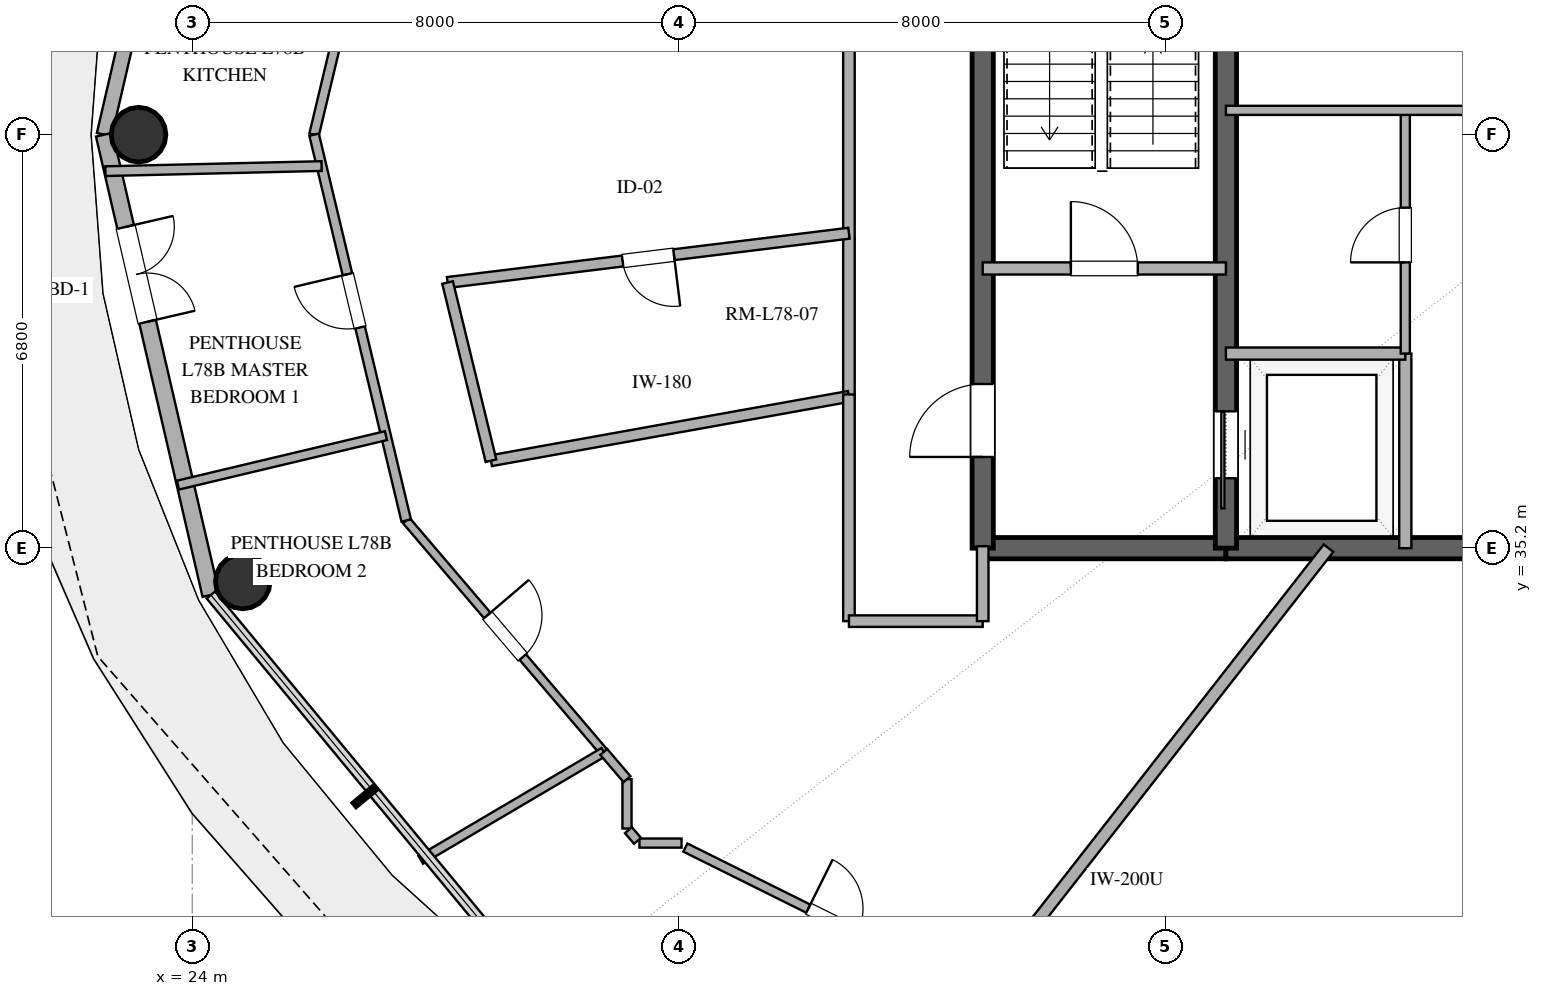
"""IFC4 building model, lengths in metres.
Left out: names, types, materials, properties, quantities, classifications, styles, units other than length and angle.
Written with IfcOpenShell. Run it as: python <this file> out.ifc"""

import sys

from ifc_helpers import new_model, si_unit, direction, frame, frame_2d, origin, origin_2d, place, context, subcontext, project, spatial, rectangle, hollow_circle, extrude, element, fill, save


model = new_model("IFC4")
c1 = context("Model", 3, precision=1e-05, world=origin(), true_north=direction((0.0, 1.0)))
c2 = subcontext(c1, "Body", "Model", "MODEL_VIEW")
j1 = project(units=[si_unit("LENGTHUNIT", "METRE"), si_unit("PLANEANGLEUNIT", "RADIAN")], contexts=[c1])
p1 = place(None, origin())
s1 = spatial("IfcSite", under=j1, at=p1, CompositionType="ELEMENT")
p2 = place(p1, origin())
s2 = spatial("IfcBuilding", under=s1, at=p2, CompositionType="ELEMENT")
p3 = place(p2, frame((0.0, 0.0, 301.8)))
s3 = spatial("IfcBuildingStorey", under=s2, at=p3, CompositionType="ELEMENT", Elevation=301.8)
p4 = place(p3, frame((37.0, 35.2, 0.0), z_axis=(0.0, 0.0, 1.0), x_axis=(1.0, 0.0, 0.0)))
e1 = element("IfcWall", 1, at=p4, inside=s3, PredefinedType="SHEAR", context=c2, shape_type="SweptSolid", body=[
    extrude(rectangle(XDim=4.0, YDim=0.35, at=frame_2d((2.0, 0.0))), origin(), (0.0, 0.0, 1.0), 3.37),
])
p5 = place(p3, frame((41.0, 35.2, 0.0), z_axis=(0.0, 0.0, 1.0), x_axis=(1.0, 0.0, 0.0)))
e2 = element("IfcWall", 2, at=p5, inside=s3, PredefinedType="SHEAR", context=c2, shape_type="SweptSolid", body=[
    extrude(rectangle(XDim=14.0, YDim=0.35, at=frame_2d((7.0, 0.0))), origin(), (0.0, 0.0, 1.0), 3.37),
])
p6 = place(p5, frame((6.1, 0.0, 0.0)))
e3 = element("IfcOpeningElement", 3, at=p6, cuts=e2, PredefinedType="OPENING", context=c2, shape_type="SweptSolid", body=[
    extrude(rectangle(XDim=1.8, YDim=2.25, at=frame_2d((0.9, 1.125))), frame((0.0, 0.185, 0.0), z_axis=(0.0, -1.0, 0.0), x_axis=(1.0, 0.0, 0.0)), (0.0, 0.0, 1.0), 0.37),
])
p7 = place(p3, frame((37.0, 35.2, 0.0), z_axis=(0.0, 0.0, 1.0), x_axis=(0.0, 1.0, 0.0)))
e4 = element("IfcWall", 4, at=p7, inside=s3, PredefinedType="SHEAR", context=c2, shape_type="SweptSolid", body=[
    extrude(rectangle(XDim=13.6, YDim=0.35, at=frame_2d((6.8, 0.0))), origin(), (0.0, 0.0, 1.0), 3.37),
])
p8 = place(p7, frame((1.5, 0.0, 0.0)))
e5 = element("IfcOpeningElement", 5, at=p8, cuts=e4, PredefinedType="OPENING", context=c2, shape_type="SweptSolid", body=[
    extrude(rectangle(XDim=1.2, YDim=2.15, at=frame_2d((0.6, 1.075))), frame((0.0, 0.185, 0.0), z_axis=(0.0, -1.0, 0.0), x_axis=(1.0, 0.0, 0.0)), (0.0, 0.0, 1.0), 0.37),
])
p9 = place(p3, frame((41.0, 35.2, 0.0), z_axis=(0.0, 0.0, 1.0), x_axis=(0.0, 1.0, 0.0)))
e6 = element("IfcWall", 6, at=p9, inside=s3, PredefinedType="SHEAR", context=c2, shape_type="SweptSolid", body=[
    extrude(rectangle(XDim=13.6, YDim=0.35, at=frame_2d((6.8, 0.0))), origin(), (0.0, 0.0, 1.0), 3.37),
])
p10 = place(p9, frame((1.15, 0.0, 0.0)))
e7 = element("IfcOpeningElement", 7, at=p10, cuts=e6, PredefinedType="OPENING", context=c2, shape_type="SweptSolid", body=[
    extrude(rectangle(XDim=1.1, YDim=2.2, at=frame_2d((0.55, 1.1))), frame((0.0, 0.185, 0.0), z_axis=(0.0, -1.0, 0.0), x_axis=(1.0, 0.0, 0.0)), (0.0, 0.0, 1.0), 0.37),
])
for number, where, z_axis, x_axis in (
    (8, (23.117, 42.0, 0.0), (0.0, 0.0, 1.0), (1.0, 0.0, 0.0)),
    (9, (24.831, 34.653, 0.0), (0.0, 0.0, 1.0), (1.0, 0.0, 0.0)),
):
    element("IfcColumn", number, at=place(p3, frame(where, z_axis=z_axis, x_axis=x_axis)), inside=s3, PredefinedType="COLUMN", context=c2, shape_type="SweptSolid", body=[
        extrude(hollow_circle(Radius=0.45, WallThickness=0.025, at=origin_2d()), origin(), (0.0, 0.0, 1.0), 3.37),
    ])
p11 = place(p3, frame((24.306, 49.57, 0.0), z_axis=(0.0, 0.0, 1.0), x_axis=(-0.225635078214, -0.974211892495, 0.0)))
e10 = element("IfcWall", 10, at=p11, inside=s3, PredefinedType="SOLIDWALL", context=c2, shape_type="SweptSolid", body=[
    extrude(rectangle(XDim=7.77, YDim=0.25, at=frame_2d((3.885, 0.0))), origin(), (0.0, 0.0, 1.0), 3.37),
])
p12 = place(p3, frame((22.553, 42.0, 0.0), z_axis=(0.0, 0.0, 1.0), x_axis=(0.225635078214, -0.974211892495, 0.0)))
e11 = element("IfcWall", 11, at=p12, inside=s3, PredefinedType="SOLIDWALL", context=c2, shape_type="SweptSolid", body=[
    extrude(rectangle(XDim=7.77, YDim=0.28, at=frame_2d((3.885, 0.0))), origin(), (0.0, 0.0, 1.0), 3.37),
])
p13 = place(p12, frame((1.557, 0.0, 0.0)))
e12 = element("IfcOpeningElement", 12, at=p13, cuts=e11, PredefinedType="OPENING", context=c2, shape_type="SweptSolid", body=[
    extrude(rectangle(XDim=1.6, YDim=2.25, at=frame_2d((0.8, 1.125))), frame((0.0, 0.15, 0.0), z_axis=(0.0, -1.0, 0.0), x_axis=(1.0, 0.0, 0.0)), (0.0, 0.0, 1.0), 0.3),
])
p14 = place(p3, frame((37.0, 39.8, 0.0), z_axis=(0.0, 0.0, 1.0), x_axis=(1.0, 0.0, 0.0)))
e13 = element("IfcWall", 13, at=p14, inside=s3, PredefinedType="SOLIDWALL", context=c2, shape_type="SweptSolid", body=[
    extrude(rectangle(XDim=4.0, YDim=0.2, at=frame_2d((2.0, 0.0))), origin(), (0.0, 0.0, 1.0), 2.73),
])
p15 = place(p14, frame((1.45, 0.0, 0.0)))
e14 = element("IfcOpeningElement", 14, at=p15, cuts=e13, PredefinedType="OPENING", context=c2, shape_type="SweptSolid", body=[
    extrude(rectangle(XDim=1.1, YDim=2.15, at=frame_2d((0.55, 1.075))), frame((0.0, 0.11, 0.0), z_axis=(0.0, -1.0, 0.0), x_axis=(1.0, 0.0, 0.0)), (0.0, 0.0, 1.0), 0.22),
])
p16 = place(p3, frame((43.95, 35.2, 0.0), z_axis=(0.0, 0.0, 1.0), x_axis=(0.0, 1.0, 0.0)))
e15 = element("IfcWall", 15, at=p16, inside=s3, PredefinedType="SOLIDWALL", context=c2, shape_type="SweptSolid", body=[
    extrude(rectangle(XDim=3.2, YDim=0.2, at=frame_2d((1.6, 0.0))), origin(), (0.0, 0.0, 1.0), 2.73),
])
p17 = place(p3, frame((41.0, 38.4, 0.0), z_axis=(0.0, 0.0, 1.0), x_axis=(1.0, 0.0, 0.0)))
e16 = element("IfcWall", 16, at=p17, inside=s3, PredefinedType="SOLIDWALL", context=c2, shape_type="SweptSolid", body=[
    extrude(rectangle(XDim=2.95, YDim=0.2, at=frame_2d((1.475, 0.0))), origin(), (0.0, 0.0, 1.0), 2.73),
])
p18 = place(p3, frame((43.95, 38.4, 0.0), z_axis=(0.0, 0.0, 1.0), x_axis=(0.0, 1.0, 0.0)))
e17 = element("IfcWall", 17, at=p18, inside=s3, PredefinedType="PARTITIONING", context=c2, shape_type="SweptSolid", body=[
    extrude(rectangle(XDim=4.0, YDim=0.15, at=frame_2d((2.0, 0.0))), origin(), (0.0, 0.0, 1.0), 2.73),
])
p19 = place(p18, frame((1.5, 0.0, 0.0)))
e18 = element("IfcOpeningElement", 18, at=p19, cuts=e17, PredefinedType="OPENING", context=c2, shape_type="SweptSolid", body=[
    extrude(rectangle(XDim=0.9, YDim=2.15, at=frame_2d((0.45, 1.075))), frame((0.0, 0.085, 0.0), z_axis=(0.0, -1.0, 0.0), x_axis=(1.0, 0.0, 0.0)), (0.0, 0.0, 1.0), 0.17),
])
p20 = place(p3, frame((41.0, 42.4, 0.0), z_axis=(0.0, 0.0, 1.0), x_axis=(1.0, 0.0, 0.0)))
e19 = element("IfcWall", 19, at=p20, inside=s3, PredefinedType="PARTITIONING", context=c2, shape_type="SweptSolid", body=[
    extrude(rectangle(XDim=4.85, YDim=0.15, at=frame_2d((2.425, 0.0))), origin(), (0.0, 0.0, 1.0), 2.73),
])
p21 = place(p3, frame((34.8, 37.663, 0.0), z_axis=(0.0, 0.0, 1.0), x_axis=(0.0, 1.0, 0.0)))
e20 = element("IfcWall", 20, at=p21, inside=s3, PredefinedType="PARTITIONING", context=c2, shape_type="SweptSolid", body=[
    extrude(rectangle(XDim=13.237, YDim=0.19, at=frame_2d((6.618, 0.0))), origin(), (0.0, 0.0, 1.0), 2.73),
])
p22 = place(p21, frame((7.46, 0.0, 0.0)))
e21 = element("IfcOpeningElement", 21, at=p22, cuts=e20, PredefinedType="OPENING", context=c2, shape_type="SweptSolid", body=[
    extrude(rectangle(XDim=1.0, YDim=2.2, at=frame_2d((0.5, 1.1))), frame((0.0, 0.105, 0.0), z_axis=(0.0, -1.0, 0.0), x_axis=(1.0, 0.0, 0.0)), (0.0, 0.0, 1.0), 0.21),
])
p23 = place(p3, frame((42.687, 35.2, 0.0), z_axis=(0.0, 0.0, 1.0), x_axis=(-0.615663811723, -0.788008928208, 0.0)))
e22 = element("IfcWall", 22, at=p23, inside=s3, PredefinedType="PARTITIONING", context=c2, shape_type="SweptSolid", body=[
    extrude(rectangle(XDim=12.701, YDim=0.2, at=frame_2d((6.351, 0.0))), origin(), (0.0, 0.0, 1.0), 2.73),
])
p24 = place(p3, frame((34.8, 40.379, 0.0), z_axis=(0.0, 0.0, 1.0), x_axis=(-0.99254493565, -0.121879246453, 0.0)))
e23 = element("IfcWall", 23, at=p24, inside=s3, PredefinedType="PLUMBINGWALL", context=c2, shape_type="SweptSolid", body=[
    extrude(rectangle(XDim=6.65, YDim=0.18, at=frame_2d((3.325, 0.0))), origin(), (0.0, 0.0, 1.0), 2.73),
])
p25 = place(p24, frame((2.9, 0.0, 0.0)))
e24 = element("IfcOpeningElement", 24, at=p25, cuts=e23, PredefinedType="OPENING", context=c2, shape_type="SweptSolid", body=[
    extrude(rectangle(XDim=0.85, YDim=2.1, at=frame_2d((0.425, 1.05))), frame((0.0, 0.1, 0.0), z_axis=(0.0, -1.0, 0.0), x_axis=(1.0, 0.0, 0.0)), (0.0, 0.0, 1.0), 0.2),
])
p26 = place(p3, frame((28.913, 36.638, 0.0), z_axis=(0.0, 0.0, 1.0), x_axis=(0.984251000252, 0.176776606208, 0.0)))
e25 = element("IfcWall", 25, at=p26, inside=s3, PredefinedType="PLUMBINGWALL", context=c2, shape_type="SweptSolid", body=[
    extrude(rectangle(XDim=5.981, YDim=0.18, at=frame_2d((2.991, 0.0))), origin(), (0.0, 0.0, 1.0), 2.73),
])
p27 = place(p3, frame((32.11, 30.276, 0.0), z_axis=(0.0, 0.0, 1.0), x_axis=(0.895587674753, -0.444885060247, 0.0)))
e26 = element("IfcWall", 26, at=p27, inside=s3, PredefinedType="PARTITIONING", context=c2, shape_type="SweptSolid", body=[
    extrude(rectangle(XDim=5.414, YDim=0.15, at=frame_2d((2.707, 0.0))), origin(), (0.0, 0.0, 1.0), 2.73),
])
p28 = place(p27, frame((2.257, 0.0, 0.0)))
e27 = element("IfcOpeningElement", 27, at=p28, cuts=e26, PredefinedType="OPENING", context=c2, shape_type="SweptSolid", body=[
    extrude(rectangle(XDim=0.9, YDim=2.1, at=frame_2d((0.45, 1.05))), frame((0.0, 0.085, 0.0), z_axis=(0.0, -1.0, 0.0), x_axis=(1.0, 0.0, 0.0)), (0.0, 0.0, 1.0), 0.17),
])
p29 = place(p3, frame((27.204, 47.026, 0.0), z_axis=(0.0, 0.0, 1.0), x_axis=(-0.232306036208, -0.972642743016, 0.0)))
e28 = element("IfcWall", 28, at=p29, inside=s3, PredefinedType="PLUMBINGWALL", context=c2, shape_type="SweptSolid", body=[
    extrude(rectangle(XDim=5.167, YDim=0.16, at=frame_2d((2.584, 0.0))), origin(), (0.0, 0.0, 1.0), 2.73),
])
p30 = place(p29, frame((2.134, 0.0, 0.0)))
e29 = element("IfcOpeningElement", 29, at=p30, cuts=e28, PredefinedType="OPENING", context=c2, shape_type="SweptSolid", body=[
    extrude(rectangle(XDim=0.9, YDim=2.1, at=frame_2d((0.45, 1.05))), frame((0.0, 0.09, 0.0), z_axis=(0.0, -1.0, 0.0), x_axis=(1.0, 0.0, 0.0)), (0.0, 0.0, 1.0), 0.18),
])
p31 = place(p3, frame((27.519, 35.655, 0.0), z_axis=(0.0, 0.0, 1.0), x_axis=(0.649223146716, -0.760597992219, 0.0)))
e30 = element("IfcWall", 30, at=p31, inside=s3, PredefinedType="PARTITIONING", context=c2, shape_type="SweptSolid", body=[
    extrude(rectangle(XDim=5.004, YDim=0.14, at=frame_2d((2.502, 0.0))), origin(), (0.0, 0.0, 1.0), 2.73),
])
p32 = place(p31, frame((2.052, 0.0, 0.0)))
e31 = element("IfcOpeningElement", 31, at=p32, cuts=e30, PredefinedType="OPENING", context=c2, shape_type="SweptSolid", body=[
    extrude(rectangle(XDim=0.9, YDim=2.1, at=frame_2d((0.45, 1.05))), frame((0.0, 0.08, 0.0), z_axis=(0.0, -1.0, 0.0), x_axis=(1.0, 0.0, 0.0)), (0.0, 0.0, 1.0), 0.16),
])
p33 = place(p3, frame((27.519, 35.655, 0.0), z_axis=(0.0, 0.0, 1.0), x_axis=(-0.232298462197, 0.972644551962, 0.0)))
e32 = element("IfcWall", 32, at=p33, inside=s3, PredefinedType="PLUMBINGWALL", context=c2, shape_type="SweptSolid", body=[
    extrude(rectangle(XDim=6.523, YDim=0.16, at=frame_2d((3.262, 0.0))), origin(), (0.0, 0.0, 1.0), 2.73),
])
p34 = place(p33, frame((3.264, 0.0, 0.0)))
e33 = element("IfcOpeningElement", 33, at=p34, cuts=e32, PredefinedType="OPENING", context=c2, shape_type="SweptSolid", body=[
    extrude(rectangle(XDim=0.9, YDim=2.1, at=frame_2d((0.45, 1.05))), frame((0.0, 0.09, 0.0), z_axis=(0.0, -1.0, 0.0), x_axis=(1.0, 0.0, 0.0)), (0.0, 0.0, 1.0), 0.18),
])
p35 = place(p3, frame((34.8, 34.0, 0.0), z_axis=(0.0, 0.0, 1.0), x_axis=(0.0, 1.0, 0.0)))
e34 = element("IfcWall", 34, at=p35, inside=s3, PredefinedType="PARTITIONING", context=c2, shape_type="SweptSolid", body=[
    extrude(rectangle(XDim=3.728, YDim=0.19, at=frame_2d((1.864, 0.0))), origin(), (0.0, 0.0, 1.0), 2.73),
])
p36 = place(p3, frame((26.127, 41.484, 0.0), z_axis=(0.0, 0.0, 1.0), x_axis=(-0.999722785281, -0.023544693446, 0.0)))
e35 = element("IfcWall", 35, at=p36, inside=s3, PredefinedType="PLUMBINGWALL", context=c2, shape_type="SweptSolid", body=[
    extrude(rectangle(XDim=3.557, YDim=0.16, at=frame_2d((1.778, 0.0))), origin(), (0.0, 0.0, 1.0), 2.73),
])
p37 = place(p3, frame((23.765, 36.237, 0.0), z_axis=(0.0, 0.0, 1.0), x_axis=(0.972875448823, 0.231329550808, 0.0)))
e36 = element("IfcWall", 36, at=p37, inside=s3, PredefinedType="PARTITIONING", context=c2, shape_type="SweptSolid", body=[
    extrude(rectangle(XDim=3.517, YDim=0.15, at=frame_2d((1.758, 0.0))), origin(), (0.0, 0.0, 1.0), 2.73),
])
p38 = place(p3, frame((30.768, 31.849, 0.0), z_axis=(0.0, 0.0, 1.0), x_axis=(-0.861632311911, -0.50753301279, 0.0)))
e37 = element("IfcWall", 37, at=p38, inside=s3, PredefinedType="PARTITIONING", context=c2, shape_type="SweptSolid", body=[
    extrude(rectangle(XDim=3.494, YDim=0.15, at=frame_2d((1.747, 0.0))), origin(), (0.0, 0.0, 1.0), 2.73),
])
p39 = place(p3, frame((28.199, 39.569, 0.0), z_axis=(0.0, 0.0, 1.0), x_axis=(0.236607697995, -0.971605268229, 0.0)))
e38 = element("IfcWall", 38, at=p39, inside=s3, PredefinedType="PLUMBINGWALL", context=c2, shape_type="SweptSolid", body=[
    extrude(rectangle(XDim=3.016, YDim=0.18, at=frame_2d((1.508, 0.0))), origin(), (0.0, 0.0, 1.0), 2.73),
])
p40 = place(p3, frame((37.0, 34.0, 0.0), z_axis=(0.0, 0.0, 1.0), x_axis=(-1.0, 0.0, 0.0)))
e39 = element("IfcWall", 39, at=p40, inside=s3, PredefinedType="PARTITIONING", context=c2, shape_type="SweptSolid", body=[
    extrude(rectangle(XDim=2.2, YDim=0.19, at=frame_2d((1.1, 0.0))), origin(), (0.0, 0.0, 1.0), 2.73),
])
p41 = place(p3, frame((37.0, 35.232, 0.0), z_axis=(0.0, 0.0, 1.0), x_axis=(0.0, -1.0, 0.0)))
e40 = element("IfcWall", 40, at=p41, inside=s3, PredefinedType="PARTITIONING", context=c2, shape_type="SweptSolid", body=[
    extrude(rectangle(XDim=1.232, YDim=0.19, at=frame_2d((0.616, 0.0))), origin(), (0.0, 0.0, 1.0), 2.73),
])
p42 = place(p3, frame((31.15, 31.401, 0.0), z_axis=(0.0, 0.0, 1.0), x_axis=(0.0, -1.0, 0.0)))
e41 = element("IfcWall", 41, at=p42, inside=s3, PredefinedType="PARTITIONING", context=c2, shape_type="SweptSolid", body=[
    extrude(rectangle(XDim=0.812, YDim=0.15, at=frame_2d((0.406, 0.0))), origin(), (0.0, 0.0, 1.0), 2.73),
])
p43 = place(p3, frame((31.354, 30.35, 0.0), z_axis=(0.0, 0.0, 1.0), x_axis=(1.0, 0.0, 0.0)))
e42 = element("IfcWall", 42, at=p43, inside=s3, PredefinedType="PARTITIONING", context=c2, shape_type="SweptSolid", body=[
    extrude(rectangle(XDim=0.693, YDim=0.15, at=frame_2d((0.346, 0.0))), origin(), (0.0, 0.0, 1.0), 2.73),
])
p44 = place(p3, frame((30.768, 31.849, 0.0), z_axis=(0.0, 0.0, 1.0), x_axis=(0.649080846661, -0.760719432181, 0.0)))
e43 = element("IfcWall", 43, at=p44, inside=s3, PredefinedType="PARTITIONING", context=c2, shape_type="SweptSolid", body=[
    extrude(rectangle(XDim=0.588, YDim=0.15, at=frame_2d((0.294, 0.0))), origin(), (0.0, 0.0, 1.0), 2.73),
])
p45 = place(p3, frame((31.173, 30.562, 0.0), z_axis=(0.0, 0.0, 1.0), x_axis=(0.648874632887, -0.760895334981, 0.0)))
e44 = element("IfcWall", 44, at=p45, inside=s3, PredefinedType="PARTITIONING", context=c2, shape_type="SweptSolid", body=[
    extrude(rectangle(XDim=0.231, YDim=0.15, at=frame_2d((0.115, 0.0))), origin(), (0.0, 0.0, 1.0), 2.73),
])
p46 = place(p13, origin())
e45 = element("IfcDoor", 45, at=p46, inside=s3, OperationType="DOUBLE_DOOR_SINGLE_SWING", PredefinedType="DOOR", context=c2, shape_type="SweptSolid", body=[
    extrude(rectangle(XDim=1.6, YDim=2.25, at=frame_2d((0.8, 1.125))), frame((0.0, 0.025, 0.0), z_axis=(0.0, -1.0, 0.0), x_axis=(1.0, 0.0, 0.0)), (0.0, 0.0, 1.0), 0.05),
])
fill(e12, e45)
p47 = place(p10, origin())
e46 = element("IfcDoor", 46, at=p47, inside=s3, OperationType="SLIDING_TO_LEFT", PredefinedType="DOOR", context=c2, shape_type="SweptSolid", body=[
    extrude(rectangle(XDim=1.1, YDim=2.2, at=frame_2d((0.55, 1.1))), frame((0.0, 0.025, 0.0), z_axis=(0.0, -1.0, 0.0), x_axis=(1.0, 0.0, 0.0)), (0.0, 0.0, 1.0), 0.05),
])
fill(e7, e46)
p48 = place(p8, origin())
e47 = element("IfcDoor", 47, at=p48, inside=s3, OperationType="SINGLE_SWING_LEFT", PredefinedType="DOOR", context=c2, shape_type="SweptSolid", body=[
    extrude(rectangle(XDim=1.2, YDim=2.15, at=frame_2d((0.6, 1.075))), frame((0.0, 0.025, 0.0), z_axis=(0.0, -1.0, 0.0), x_axis=(1.0, 0.0, 0.0)), (0.0, 0.0, 1.0), 0.05),
])
fill(e5, e47)
p49 = place(p15, origin())
e48 = element("IfcDoor", 48, at=p49, inside=s3, OperationType="SINGLE_SWING_LEFT", PredefinedType="DOOR", context=c2, shape_type="SweptSolid", body=[
    extrude(rectangle(XDim=1.1, YDim=2.15, at=frame_2d((0.55, 1.075))), frame((0.0, 0.025, 0.0), z_axis=(0.0, -1.0, 0.0), x_axis=(1.0, 0.0, 0.0)), (0.0, 0.0, 1.0), 0.05),
])
fill(e14, e48)
p50 = place(p19, origin())
e49 = element("IfcDoor", 49, at=p50, inside=s3, OperationType="SINGLE_SWING_LEFT", PredefinedType="DOOR", context=c2, shape_type="SweptSolid", body=[
    extrude(rectangle(XDim=0.9, YDim=2.15, at=frame_2d((0.45, 1.075))), frame((0.0, 0.025, 0.0), z_axis=(0.0, -1.0, 0.0), x_axis=(1.0, 0.0, 0.0)), (0.0, 0.0, 1.0), 0.05),
])
fill(e18, e49)
p51 = place(p25, origin())
e50 = element("IfcDoor", 50, at=p51, inside=s3, OperationType="SINGLE_SWING_LEFT", PredefinedType="DOOR", context=c2, shape_type="SweptSolid", body=[
    extrude(rectangle(XDim=0.85, YDim=2.1, at=frame_2d((0.425, 1.05))), frame((0.0, 0.025, 0.0), z_axis=(0.0, -1.0, 0.0), x_axis=(1.0, 0.0, 0.0)), (0.0, 0.0, 1.0), 0.05),
])
fill(e24, e50)
p52 = place(p28, origin())
e51 = element("IfcDoor", 51, at=p52, inside=s3, OperationType="SINGLE_SWING_LEFT", PredefinedType="DOOR", context=c2, shape_type="SweptSolid", body=[
    extrude(rectangle(XDim=0.9, YDim=2.1, at=frame_2d((0.45, 1.05))), frame((0.0, 0.025, 0.0), z_axis=(0.0, -1.0, 0.0), x_axis=(1.0, 0.0, 0.0)), (0.0, 0.0, 1.0), 0.05),
])
fill(e27, e51)
p53 = place(p32, origin())
e52 = element("IfcDoor", 52, at=p53, inside=s3, OperationType="SINGLE_SWING_LEFT", PredefinedType="DOOR", context=c2, shape_type="SweptSolid", body=[
    extrude(rectangle(XDim=0.9, YDim=2.1, at=frame_2d((0.45, 1.05))), frame((0.0, 0.025, 0.0), z_axis=(0.0, -1.0, 0.0), x_axis=(1.0, 0.0, 0.0)), (0.0, 0.0, 1.0), 0.05),
])
fill(e31, e52)
p54 = place(p34, origin())
e53 = element("IfcDoor", 53, at=p54, inside=s3, OperationType="SINGLE_SWING_RIGHT", PredefinedType="DOOR", context=c2, shape_type="SweptSolid", body=[
    extrude(rectangle(XDim=0.9, YDim=2.1, at=frame_2d((0.45, 1.05))), frame((0.0, 0.025, 0.0), z_axis=(0.0, -1.0, 0.0), x_axis=(1.0, 0.0, 0.0)), (0.0, 0.0, 1.0), 0.05),
])
fill(e33, e53)
save(model, sys.argv[1])
